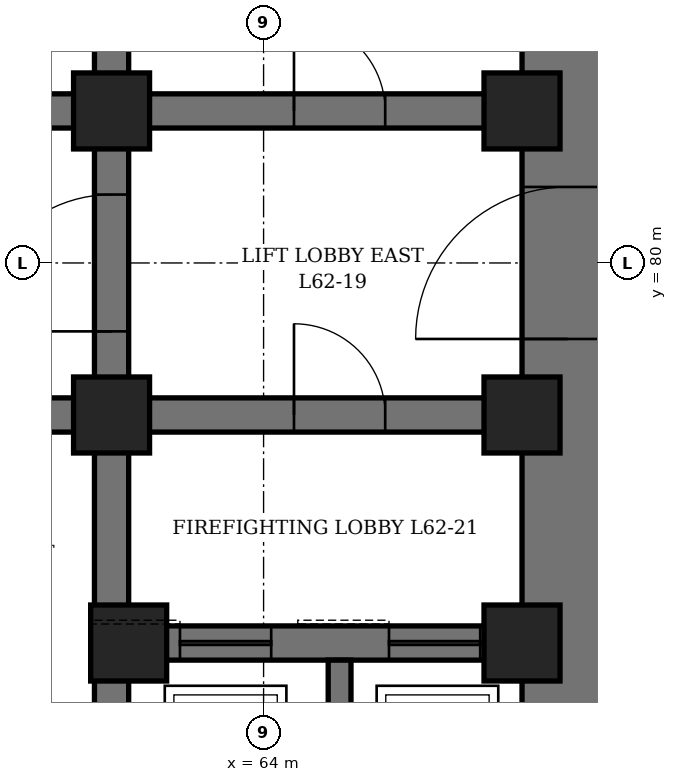
"""IFC4 building model, lengths in metres.
Left out: names, types, materials, properties, quantities, classifications, styles, units other than length and angle.
Written with IfcOpenShell. Run it as: python <this file> out.ifc"""

import sys

from ifc_helpers import new_model, si_unit, direction, frame, frame_2d, origin, origin_2d, place, context, subcontext, project, spatial, rectangle, hollow_rectangle, extrude, element, fill, save


model = new_model("IFC4")
c1 = context("Model", 3, precision=1e-05, world=origin(), true_north=direction((0.0, 1.0)))
c2 = subcontext(c1, "Body", "Model", "MODEL_VIEW")
j1 = project(units=[si_unit("LENGTHUNIT", "METRE"), si_unit("PLANEANGLEUNIT", "RADIAN")], contexts=[c1])
p1 = place(None, origin())
s1 = spatial("IfcSite", under=j1, at=p1, CompositionType="ELEMENT")
p2 = place(p1, origin())
s2 = spatial("IfcBuilding", under=s1, at=p2, CompositionType="ELEMENT")
p3 = place(p2, frame((0.0, 0.0, 275.5)))
s3 = spatial("IfcBuildingStorey", under=s2, at=p3, CompositionType="ELEMENT", Elevation=275.5)
p4 = place(p3, frame((68.0, 70.4, 0.0), z_axis=(0.0, 0.0, 1.0), x_axis=(0.0, 1.0, 0.0)))
e1 = element("IfcWall", 1, at=p4, inside=s3, PredefinedType="SHEAR", context=c2, shape_type="SweptSolid", body=[
    extrude(rectangle(XDim=19.2, YDim=1.2, at=frame_2d((9.6, 0.0))), origin(), (0.0, 0.0, 1.0), 4.2),
])
p5 = place(p4, frame((8.6, 0.0, 0.0)))
e2 = element("IfcOpeningElement", 2, at=p5, cuts=e1, PredefinedType="OPENING", context=c2, shape_type="SweptSolid", body=[
    extrude(rectangle(XDim=2.0, YDim=2.4, at=frame_2d((1.0, 1.2))), frame((0.0, 0.61, 0.0), z_axis=(0.0, -1.0, 0.0), x_axis=(1.0, 0.0, 0.0)), (0.0, 0.0, 1.0), 1.22),
])
p6 = place(p3, frame((62.0, 71.6, 0.0), z_axis=(0.0, 0.0, 1.0), x_axis=(0.0, 1.0, 0.0)))
e3 = element("IfcWall", 3, at=p6, inside=s3, PredefinedType="SHEAR", context=c2, shape_type="SweptSolid", body=[
    extrude(rectangle(XDim=16.8, YDim=0.45, at=frame_2d((8.4, 0.0))), origin(), (0.0, 0.0, 1.0), 4.2),
])
p7 = place(p6, frame((7.5, 0.0, 0.0)))
e4 = element("IfcOpeningElement", 4, at=p7, cuts=e3, PredefinedType="OPENING", context=c2, shape_type="SweptSolid", body=[
    extrude(rectangle(XDim=1.8, YDim=2.4, at=frame_2d((0.9, 1.2))), frame((0.0, 0.235, 0.0), z_axis=(0.0, -1.0, 0.0), x_axis=(1.0, 0.0, 0.0)), (0.0, 0.0, 1.0), 0.47),
])
p8 = place(p3, frame((62.225, 75.0, 0.0), z_axis=(0.0, 0.0, 1.0), x_axis=(1.0, 0.0, 0.0)))
e5 = element("IfcWall", 5, at=p8, inside=s3, PredefinedType="SHEAR", context=c2, shape_type="SweptSolid", body=[
    extrude(rectangle(XDim=5.175, YDim=0.45, at=frame_2d((2.587, 0.0))), origin(), (0.0, 0.0, 1.0), 4.2),
])
p9 = place(p8, frame((0.675, 0.0, 0.0)))
e6 = element("IfcOpeningElement", 6, at=p9, cuts=e5, PredefinedType="OPENING", context=c2, shape_type="SweptSolid", body=[
    extrude(rectangle(XDim=1.2, YDim=2.2, at=frame_2d((0.6, 1.1))), frame((0.0, 0.235, 0.0), z_axis=(0.0, -1.0, 0.0), x_axis=(1.0, 0.0, 0.0)), (0.0, 0.0, 1.0), 0.47),
])
p10 = place(p8, frame((3.425, 0.0, 0.0)))
e7 = element("IfcOpeningElement", 7, at=p10, cuts=e5, PredefinedType="OPENING", context=c2, shape_type="SweptSolid", body=[
    extrude(rectangle(XDim=1.2, YDim=2.2, at=frame_2d((0.6, 1.1))), frame((0.0, 0.235, 0.0), z_axis=(0.0, -1.0, 0.0), x_axis=(1.0, 0.0, 0.0)), (0.0, 0.0, 1.0), 0.47),
])
p11 = place(p3, frame((62.225, 78.0, 0.0), z_axis=(0.0, 0.0, 1.0), x_axis=(1.0, 0.0, 0.0)))
e8 = element("IfcWall", 8, at=p11, inside=s3, PredefinedType="SHEAR", context=c2, shape_type="SweptSolid", body=[
    extrude(rectangle(XDim=5.175, YDim=0.45, at=frame_2d((2.587, 0.0))), origin(), (0.0, 0.0, 1.0), 4.2),
])
p12 = place(p11, frame((2.175, 0.0, 0.0)))
e9 = element("IfcOpeningElement", 9, at=p12, cuts=e8, PredefinedType="OPENING", context=c2, shape_type="SweptSolid", body=[
    extrude(rectangle(XDim=1.2, YDim=2.1, at=frame_2d((0.6, 1.05))), frame((0.0, 0.235, 0.0), z_axis=(0.0, -1.0, 0.0), x_axis=(1.0, 0.0, 0.0)), (0.0, 0.0, 1.0), 0.47),
])
p13 = place(p3, frame((62.225, 82.0, 0.0), z_axis=(0.0, 0.0, 1.0), x_axis=(1.0, 0.0, 0.0)))
e10 = element("IfcWall", 10, at=p13, inside=s3, PredefinedType="SHEAR", context=c2, shape_type="SweptSolid", body=[
    extrude(rectangle(XDim=5.175, YDim=0.45, at=frame_2d((2.587, 0.0))), origin(), (0.0, 0.0, 1.0), 4.2),
])
p14 = place(p13, frame((2.175, 0.0, 0.0)))
e11 = element("IfcOpeningElement", 11, at=p14, cuts=e10, PredefinedType="OPENING", context=c2, shape_type="SweptSolid", body=[
    extrude(rectangle(XDim=1.2, YDim=2.1, at=frame_2d((0.6, 1.05))), frame((0.0, 0.235, 0.0), z_axis=(0.0, -1.0, 0.0), x_axis=(1.0, 0.0, 0.0)), (0.0, 0.0, 1.0), 0.47),
])
p15 = place(p3, frame((50.225, 78.0, 0.0), z_axis=(0.0, 0.0, 1.0), x_axis=(1.0, 0.0, 0.0)))
e12 = element("IfcWall", 12, at=p15, inside=s3, PredefinedType="SHEAR", context=c2, shape_type="SweptSolid", body=[
    extrude(rectangle(XDim=11.55, YDim=0.45, at=frame_2d((5.775, 0.0))), origin(), (0.0, 0.0, 1.0), 4.2),
])
p16 = place(p15, frame((0.825, 0.0, 0.0)))
e13 = element("IfcOpeningElement", 13, at=p16, cuts=e12, PredefinedType="OPENING", context=c2, shape_type="SweptSolid", body=[
    extrude(rectangle(XDim=0.9, YDim=2.1, at=frame_2d((0.45, 1.05))), frame((0.0, 0.235, 0.0), z_axis=(0.0, -1.0, 0.0), x_axis=(1.0, 0.0, 0.0)), (0.0, 0.0, 1.0), 0.47),
])
p17 = place(p15, frame((3.825, 0.0, 0.0)))
e14 = element("IfcOpeningElement", 14, at=p17, cuts=e12, PredefinedType="OPENING", context=c2, shape_type="SweptSolid", body=[
    extrude(rectangle(XDim=0.9, YDim=2.1, at=frame_2d((0.45, 1.05))), frame((0.0, 0.235, 0.0), z_axis=(0.0, -1.0, 0.0), x_axis=(1.0, 0.0, 0.0)), (0.0, 0.0, 1.0), 0.47),
])
p18 = place(p15, frame((6.825, 0.0, 0.0)))
e15 = element("IfcOpeningElement", 15, at=p18, cuts=e12, PredefinedType="OPENING", context=c2, shape_type="SweptSolid", body=[
    extrude(rectangle(XDim=0.9, YDim=2.1, at=frame_2d((0.45, 1.05))), frame((0.0, 0.235, 0.0), z_axis=(0.0, -1.0, 0.0), x_axis=(1.0, 0.0, 0.0)), (0.0, 0.0, 1.0), 0.47),
])
p19 = place(p15, frame((9.825, 0.0, 0.0)))
e16 = element("IfcOpeningElement", 16, at=p19, cuts=e12, PredefinedType="OPENING", context=c2, shape_type="SweptSolid", body=[
    extrude(rectangle(XDim=0.9, YDim=2.1, at=frame_2d((0.45, 1.05))), frame((0.0, 0.235, 0.0), z_axis=(0.0, -1.0, 0.0), x_axis=(1.0, 0.0, 0.0)), (0.0, 0.0, 1.0), 0.47),
])
p20 = place(p3, frame((50.225, 82.0, 0.0), z_axis=(0.0, 0.0, 1.0), x_axis=(1.0, 0.0, 0.0)))
e17 = element("IfcWall", 17, at=p20, inside=s3, PredefinedType="SHEAR", context=c2, shape_type="SweptSolid", body=[
    extrude(rectangle(XDim=11.55, YDim=0.45, at=frame_2d((5.775, 0.0))), origin(), (0.0, 0.0, 1.0), 4.2),
])
p21 = place(p20, frame((0.825, 0.0, 0.0)))
e18 = element("IfcOpeningElement", 18, at=p21, cuts=e17, PredefinedType="OPENING", context=c2, shape_type="SweptSolid", body=[
    extrude(rectangle(XDim=0.9, YDim=2.1, at=frame_2d((0.45, 1.05))), frame((0.0, 0.235, 0.0), z_axis=(0.0, -1.0, 0.0), x_axis=(1.0, 0.0, 0.0)), (0.0, 0.0, 1.0), 0.47),
])
p22 = place(p20, frame((3.825, 0.0, 0.0)))
e19 = element("IfcOpeningElement", 19, at=p22, cuts=e17, PredefinedType="OPENING", context=c2, shape_type="SweptSolid", body=[
    extrude(rectangle(XDim=0.9, YDim=2.1, at=frame_2d((0.45, 1.05))), frame((0.0, 0.235, 0.0), z_axis=(0.0, -1.0, 0.0), x_axis=(1.0, 0.0, 0.0)), (0.0, 0.0, 1.0), 0.47),
])
p23 = place(p20, frame((6.825, 0.0, 0.0)))
e20 = element("IfcOpeningElement", 20, at=p23, cuts=e17, PredefinedType="OPENING", context=c2, shape_type="SweptSolid", body=[
    extrude(rectangle(XDim=0.9, YDim=2.1, at=frame_2d((0.45, 1.05))), frame((0.0, 0.235, 0.0), z_axis=(0.0, -1.0, 0.0), x_axis=(1.0, 0.0, 0.0)), (0.0, 0.0, 1.0), 0.47),
])
p24 = place(p20, frame((9.825, 0.0, 0.0)))
e21 = element("IfcOpeningElement", 21, at=p24, cuts=e17, PredefinedType="OPENING", context=c2, shape_type="SweptSolid", body=[
    extrude(rectangle(XDim=0.9, YDim=2.1, at=frame_2d((0.45, 1.05))), frame((0.0, 0.235, 0.0), z_axis=(0.0, -1.0, 0.0), x_axis=(1.0, 0.0, 0.0)), (0.0, 0.0, 1.0), 0.47),
])
p25 = place(p3, frame((65.0, 71.6, 0.0), z_axis=(0.0, 0.0, 1.0), x_axis=(0.0, 1.0, 0.0)))
e22 = element("IfcWall", 22, at=p25, inside=s3, PredefinedType="SHEAR", context=c2, shape_type="SweptSolid", body=[
    extrude(rectangle(XDim=3.175, YDim=0.3, at=frame_2d((1.587, 0.0))), origin(), (0.0, 0.0, 1.0), 4.2),
])
for number, where, z_axis, x_axis in (
    (23, (62.0, 78.0, 0.0), (0.0, 0.0, 1.0), (1.0, 0.0, 0.0)),
    (24, (62.0, 82.0, 0.0), (0.0, 0.0, 1.0), (1.0, 0.0, 0.0)),
    (25, (62.225, 75.0, 0.0), (0.0, 0.0, 1.0), (1.0, 0.0, 0.0)),
    (26, (67.4, 75.0, 0.0), (0.0, 0.0, 1.0), (1.0, 0.0, 0.0)),
    (27, (67.4, 78.0, 0.0), (0.0, 0.0, 1.0), (1.0, 0.0, 0.0)),
    (28, (67.4, 82.0, 0.0), (0.0, 0.0, 1.0), (1.0, 0.0, 0.0)),
):
    element("IfcColumn", number, at=place(p3, frame(where, z_axis=z_axis, x_axis=x_axis)), inside=s3, PredefinedType="COLUMN", context=c2, shape_type="SweptSolid", body=[
        extrude(hollow_rectangle(XDim=1.0, YDim=1.0, WallThickness=0.15, at=origin_2d()), origin(), (0.0, 0.0, 1.0), 4.2),
    ])
p26 = place(p14, origin())
e29 = element("IfcDoor", 29, at=p26, inside=s3, OperationType="SINGLE_SWING_LEFT", PredefinedType="DOOR", context=c2, shape_type="SweptSolid", body=[
    extrude(rectangle(XDim=1.2, YDim=2.1, at=frame_2d((0.6, 1.05))), frame((0.0, 0.225, 0.0), z_axis=(0.0, -1.0, 0.0), x_axis=(1.0, 0.0, 0.0)), (0.0, 0.0, 1.0), 0.449),
])
fill(e11, e29)
p27 = place(p5, origin())
e30 = element("IfcDoor", 30, at=p27, inside=s3, OperationType="DOUBLE_DOOR_SINGLE_SWING", PredefinedType="DOOR", context=c2, shape_type="SweptSolid", body=[
    extrude(rectangle(XDim=2.0, YDim=2.4, at=frame_2d((1.0, 1.2))), frame((0.0, 0.35, 0.0), z_axis=(0.0, -1.0, 0.0), x_axis=(1.0, 0.0, 0.0)), (0.0, 0.0, 1.0), 0.7),
])
fill(e2, e30)
p28 = place(p7, origin())
e31 = element("IfcDoor", 31, at=p28, inside=s3, OperationType="DOUBLE_DOOR_SINGLE_SWING", PredefinedType="DOOR", context=c2, shape_type="SweptSolid", body=[
    extrude(rectangle(XDim=1.8, YDim=2.4, at=frame_2d((0.9, 1.2))), frame((0.0, 0.225, 0.0), z_axis=(0.0, -1.0, 0.0), x_axis=(1.0, 0.0, 0.0)), (0.0, 0.0, 1.0), 0.449),
])
fill(e4, e31)
p29 = place(p12, origin())
e32 = element("IfcDoor", 32, at=p29, inside=s3, OperationType="SINGLE_SWING_RIGHT", PredefinedType="DOOR", context=c2, shape_type="SweptSolid", body=[
    extrude(rectangle(XDim=1.2, YDim=2.1, at=frame_2d((0.6, 1.05))), frame((0.0, 0.225, 0.0), z_axis=(0.0, -1.0, 0.0), x_axis=(1.0, 0.0, 0.0)), (0.0, 0.0, 1.0), 0.449),
])
fill(e9, e32)
p30 = place(p9, origin())
e33 = element("IfcDoor", 33, at=p30, inside=s3, OperationType="SLIDING_TO_LEFT", PredefinedType="DOOR", context=c2, shape_type="SweptSolid", body=[
    extrude(rectangle(XDim=1.2, YDim=2.2, at=frame_2d((0.6, 1.1))), frame((0.0, 0.225, 0.0), z_axis=(0.0, -1.0, 0.0), x_axis=(1.0, 0.0, 0.0)), (0.0, 0.0, 1.0), 0.449),
])
fill(e6, e33)
p31 = place(p10, origin())
e34 = element("IfcDoor", 34, at=p31, inside=s3, OperationType="SLIDING_TO_LEFT", PredefinedType="DOOR", context=c2, shape_type="SweptSolid", body=[
    extrude(rectangle(XDim=1.2, YDim=2.2, at=frame_2d((0.6, 1.1))), frame((0.0, 0.225, 0.0), z_axis=(0.0, -1.0, 0.0), x_axis=(1.0, 0.0, 0.0)), (0.0, 0.0, 1.0), 0.449),
])
fill(e7, e34)
save(model, sys.argv[1])
